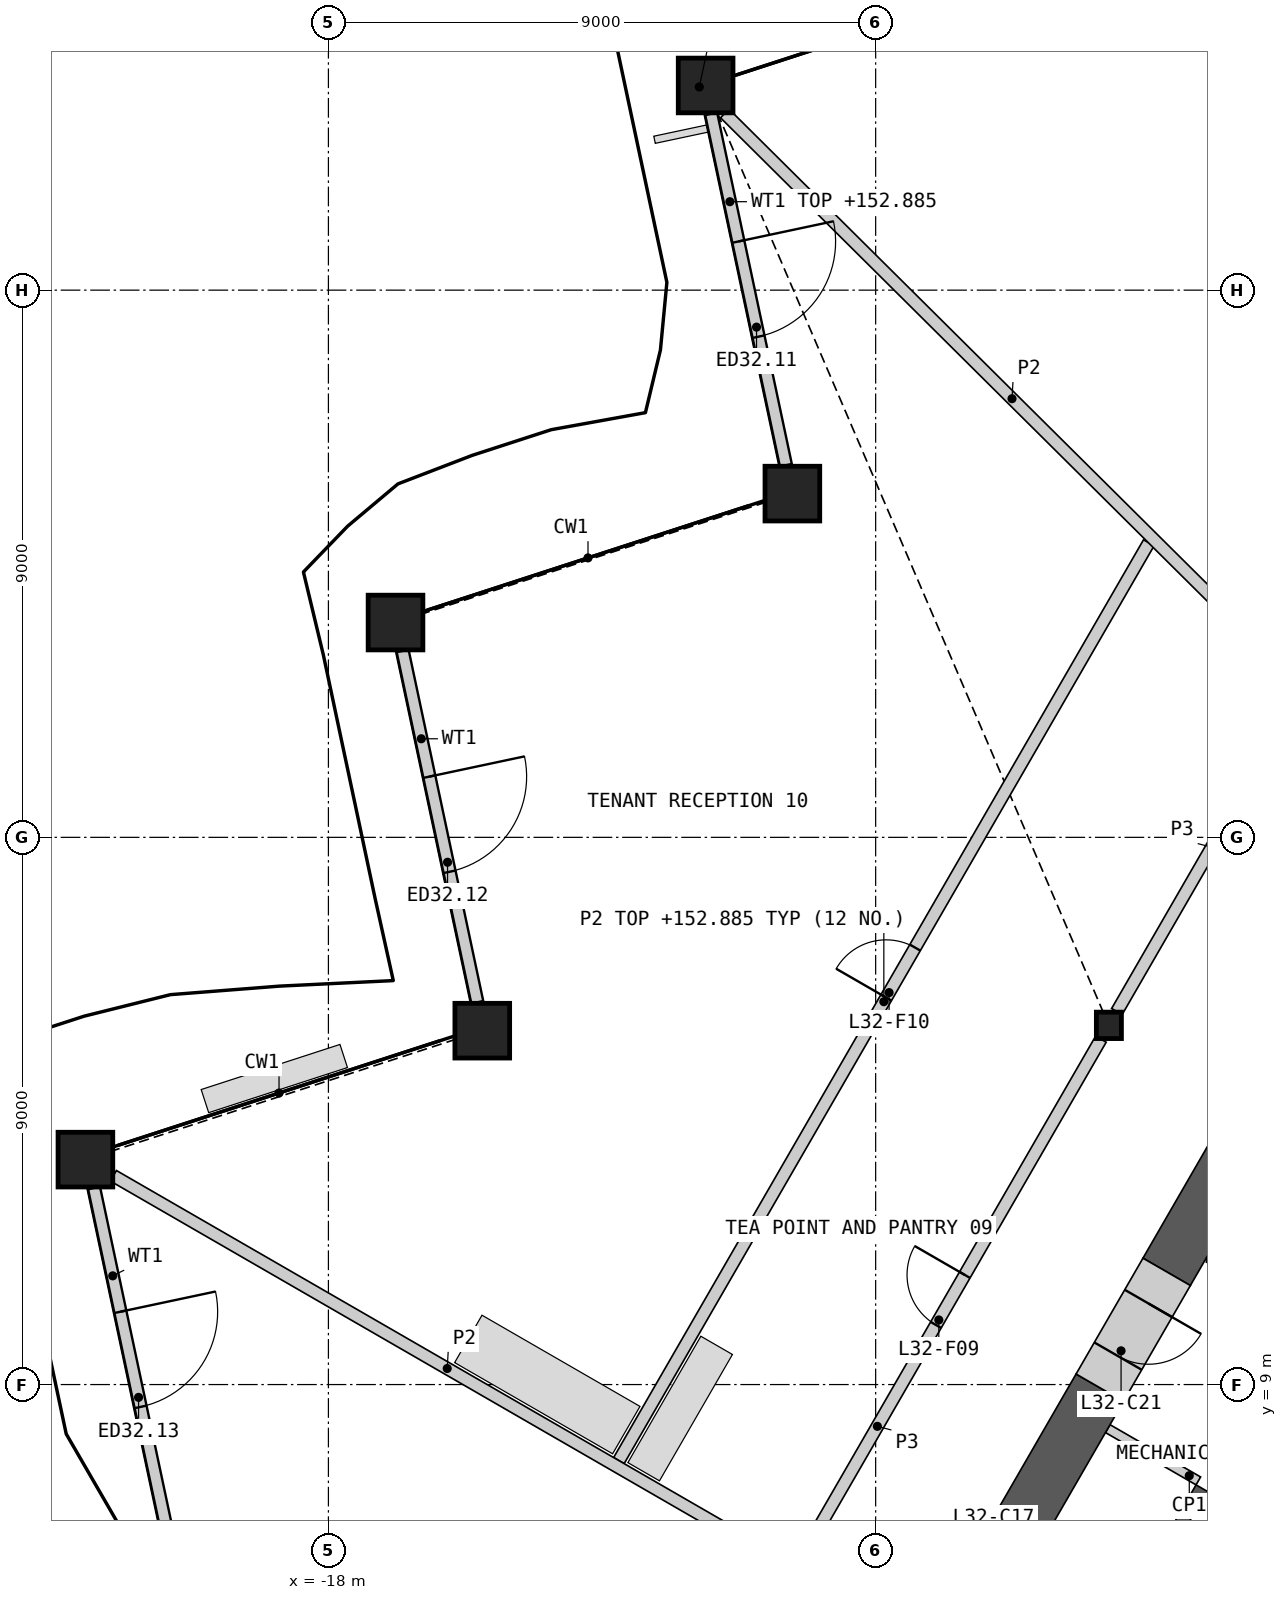
"""IFC4 building model, lengths in metres.
Left out: names, types, materials, properties, quantities, classifications, styles, units other than length and angle.
Written with IfcOpenShell. Run it as: python <this file> out.ifc"""

import sys

from ifc_helpers import new_model, si_unit, direction, frame, frame_2d, origin, origin_2d, place, context, subcontext, project, spatial, polyline, rectangle, hollow_rectangle, i_section, outline, extrude, element, fill, save


model = new_model("IFC4")
c1 = context("Model", 3, precision=1e-05, world=origin(), true_north=direction((0.0, 1.0)))
c2 = subcontext(c1, "Body", "Model", "MODEL_VIEW")
j1 = project(units=[si_unit("LENGTHUNIT", "METRE"), si_unit("PLANEANGLEUNIT", "RADIAN")], contexts=[c1])
p1 = place(None, origin())
s1 = spatial("IfcSite", under=j1, at=p1, CompositionType="ELEMENT")
p2 = place(p1, origin())
s2 = spatial("IfcBuilding", under=s1, at=p2, CompositionType="ELEMENT")
p3 = place(p2, frame((0.0, 0.0, 150.0)))
s3 = spatial("IfcBuildingStorey", under=s2, at=p3, CompositionType="ELEMENT", Elevation=150.0)
for number, where, z_axis, x_axis in (
    (1, (-11.796, 30.366, 0.0), (0.0, 0.0, 1.0), (1.0, 0.0, 0.0)),
    (2, (-10.37, 23.654, 0.0), (0.0, 0.0, 1.0), (1.0, 0.0, 0.0)),
    (3, (-16.896, 21.533, 0.0), (0.0, 0.0, 1.0), (1.0, 0.0, 0.0)),
    (4, (-15.469, 14.82, 0.0), (0.0, 0.0, 1.0), (1.0, 0.0, 0.0)),
    (5, (-21.996, 12.699, 0.0), (0.0, 0.0, 1.0), (1.0, 0.0, 0.0)),
):
    element("IfcColumn", number, at=place(p3, frame(where, z_axis=z_axis, x_axis=x_axis)), inside=s3, PredefinedType="COLUMN", context=c2, shape_type="SweptSolid", body=[
        extrude(hollow_rectangle(XDim=0.9, YDim=0.9, WallThickness=0.06, at=origin_2d()), origin(), (0.0, 0.0, 1.0), 4.2),
    ])
p4 = place(p3, frame((-5.164, 14.908, 0.0), z_axis=(0.0, 0.0, 1.0), x_axis=(1.0, 0.0, 0.0)))
e6 = element("IfcColumn", 6, at=p4, inside=s3, PredefinedType="COLUMN", context=c2, shape_type="SweptSolid", body=[
    extrude(i_section(OverallWidth=0.412, OverallDepth=0.435, WebThickness=0.036, FlangeThickness=0.057, at=origin_2d()), origin(), (0.0, 0.0, 1.0), 4.2),
])
p5 = place(p3, frame((-11.705, 29.9, 0.0), z_axis=(0.0, 0.0, 1.0), x_axis=(0.207917562075, -0.978146352741, 0.0)))
e7 = element("IfcWall", 7, at=p5, inside=s3, PredefinedType="SOLIDWALL", context=c2, shape_type="SweptSolid", body=[
    extrude(rectangle(XDim=5.909, YDim=0.2, at=frame_2d((2.954, 0.0))), origin(), (0.0, 0.0, 1.0), 2.885),
])
p6 = place(p5, frame((2.146, 0.0, 0.0)))
e8 = element("IfcOpeningElement", 8, at=p6, cuts=e7, PredefinedType="OPENING", context=c2, shape_type="SweptSolid", body=[
    extrude(rectangle(XDim=1.6, YDim=2.4, at=frame_2d((0.8, 1.2))), frame((0.0, 0.11, 0.0), z_axis=(0.0, -1.0, 0.0), x_axis=(1.0, 0.0, 0.0)), (0.0, 0.0, 1.0), 0.22),
])
p7 = place(p3, frame((-16.78, 21.066, 0.0), z_axis=(0.0, 0.0, 1.0), x_axis=(0.207917562075, -0.978146352741, 0.0)))
e9 = element("IfcWall", 9, at=p7, inside=s3, PredefinedType="SOLIDWALL", context=c2, shape_type="SweptSolid", body=[
    extrude(rectangle(XDim=5.909, YDim=0.2, at=frame_2d((2.954, 0.0))), origin(), (0.0, 0.0, 1.0), 3.189),
])
p8 = place(p7, frame((2.114, 0.0, 0.0)))
e10 = element("IfcOpeningElement", 10, at=p8, cuts=e9, PredefinedType="OPENING", context=c2, shape_type="SweptSolid", body=[
    extrude(rectangle(XDim=1.6, YDim=2.4, at=frame_2d((0.8, 1.2))), frame((0.0, 0.11, 0.0), z_axis=(0.0, -1.0, 0.0), x_axis=(1.0, 0.0, 0.0)), (0.0, 0.0, 1.0), 0.22),
])
p9 = place(p3, frame((-21.854, 12.233, 0.0), z_axis=(0.0, 0.0, 1.0), x_axis=(0.207925965623, -0.978144566421, 0.0)))
e11 = element("IfcWall", 11, at=p9, inside=s3, PredefinedType="SOLIDWALL", context=c2, shape_type="SweptSolid", body=[
    extrude(rectangle(XDim=5.908, YDim=0.2, at=frame_2d((2.954, 0.0))), origin(), (0.0, 0.0, 1.0), 3.189),
])
p10 = place(p9, frame((2.081, 0.0, 0.0)))
e12 = element("IfcOpeningElement", 12, at=p10, cuts=e11, PredefinedType="OPENING", context=c2, shape_type="SweptSolid", body=[
    extrude(rectangle(XDim=1.6, YDim=2.4, at=frame_2d((0.8, 1.2))), frame((0.0, 0.11, 0.0), z_axis=(0.0, -1.0, 0.0), x_axis=(1.0, 0.0, 0.0)), (0.0, 0.0, 1.0), 0.22),
])
p11 = place(p3, origin())
e13 = element("IfcWall", 13, at=p11, inside=s3, PredefinedType="SHEAR", context=c2, shape_type="SweptSolid", body=[
    extrude(outline(polyline([(-4.96, 0.208), (-7.131, 1.461), (-3.731, 7.35), (-1.561, 6.097), (-1.66, 5.924), (-3.652, 7.074), (-4.652, 5.342), (-2.66, 4.192), (-2.76, 4.019), (-4.752, 5.169), (-5.752, 3.437), (-3.76, 2.287), (-3.861, 2.113), (-5.852, 3.263), (-6.852, 1.531), (-4.861, 0.381), (-4.96, 0.208)])), origin(), (0.0, 0.0, 1.0), 3.8),
])
p12 = place(p3, frame((-3.693, 7.415, 0.0), z_axis=(0.0, 0.0, 1.0), x_axis=(-0.866024871741, 0.500000921525, 0.0)))
e14 = element("IfcWall", 14, at=p12, inside=s3, PredefinedType="PARTITIONING", context=c2, shape_type="SweptSolid", body=[
    extrude(rectangle(XDim=1.72, YDim=0.15, at=frame_2d((0.86, 0.0))), origin(), (0.0, 0.0, 1.0), 3.8),
])
p13 = place(p3, frame((-1.544, 11.087, 0.0), z_axis=(0.0, 0.0, 1.0), x_axis=(-1.0, 0.0, 0.0)))
e15 = element("IfcWall", 15, at=p13, inside=s3, PredefinedType="PARTITIONING", context=c2, shape_type="SweptSolid", body=[
    extrude(rectangle(XDim=2.016, YDim=0.15, at=frame_2d((1.008, 0.0))), origin(), (0.0, 0.0, 1.0), 3.8),
])
p14 = place(p3, frame((-0.39, 17.478, 0.0), z_axis=(0.0, 0.0, 1.0), x_axis=(-0.500007959642, -0.866020808234, 0.0)))
e16 = element("IfcWall", 16, at=p14, inside=s3, PredefinedType="SHEAR", context=c2, shape_type="SweptSolid", body=[
    extrude(rectangle(XDim=7.649, YDim=0.9, at=frame_2d((3.824, 0.0))), origin(), (0.0, 0.0, 1.0), 3.8),
])
p15 = place(p3, frame((-5.314, 8.948, 0.0), z_axis=(0.0, 0.0, 1.0), x_axis=(-0.49998480324, -0.86603417746, 0.0)))
e17 = element("IfcWall", 17, at=p15, inside=s3, PredefinedType="SHEAR", context=c2, shape_type="SweptSolid", body=[
    extrude(rectangle(XDim=2.792, YDim=0.9, at=frame_2d((1.396, 0.0))), origin(), (0.0, 0.0, 1.0), 3.8),
])
p16 = place(p3, frame((-4.214, 10.854, 0.0), z_axis=(0.0, 0.0, 1.0), x_axis=(-0.500077893725, -0.86598042715, 0.0)))
e18 = element("IfcWall", 18, at=p16, inside=s3, PredefinedType="SHEAR", context=c2, shape_type="SweptSolid", body=[
    extrude(rectangle(XDim=2.2, YDim=0.9, at=frame_2d((1.1, 0.0))), origin(), (0.0, 0.0, 1.0), 3.8),
])
p17 = place(p16, frame((0.6, 0.0, 0.0)))
e19 = element("IfcOpeningElement", 19, at=p17, cuts=e18, PredefinedType="OPENING", context=c2, shape_type="SweptSolid", body=[
    extrude(rectangle(XDim=1.0, YDim=2.1, at=frame_2d((0.5, 1.05))), frame((0.0, 0.46, 0.0), z_axis=(0.0, -1.0, 0.0), x_axis=(1.0, 0.0, 0.0)), (0.0, 0.0, 1.0), 0.92),
])
p18 = place(p3, frame((-10.197, 6.19, 0.0), z_axis=(0.0, 0.0, 1.0), x_axis=(0.500012035596, 0.866018454918, 0.0)))
e20 = element("IfcWall", 20, at=p18, inside=s3, PredefinedType="PARTITIONING", context=c2, shape_type="SweptSolid", body=[
    extrude(rectangle(XDim=9.803, YDim=0.2, at=frame_2d((4.902, 0.0))), origin(), (0.0, 0.0, 1.0), 3.8),
])
p19 = place(p18, frame((4.376, 0.0, 0.0)))
e21 = element("IfcOpeningElement", 21, at=p19, cuts=e20, PredefinedType="OPENING", context=c2, shape_type="SweptSolid", body=[
    extrude(rectangle(XDim=0.95, YDim=2.1, at=frame_2d((0.475, 1.05))), frame((0.0, 0.11, 0.0), z_axis=(0.0, -1.0, 0.0), x_axis=(1.0, 0.0, 0.0)), (0.0, 0.0, 1.0), 0.22),
])
p20 = place(p3, frame((-5.033, 15.135, 0.0), z_axis=(0.0, 0.0, 1.0), x_axis=(0.499980978912, 0.866036385336, 0.0)))
e22 = element("IfcWall", 22, at=p20, inside=s3, PredefinedType="PARTITIONING", context=c2, shape_type="SweptSolid", body=[
    extrude(rectangle(XDim=6.24, YDim=0.2, at=frame_2d((3.12, 0.0))), origin(), (0.0, 0.0, 1.0), 3.8),
])
p21 = place(p3, frame((-13.223, 7.75, 0.0), z_axis=(0.0, 0.0, 1.0), x_axis=(0.499991226912, 0.86603046887, 0.0)))
e23 = element("IfcWall", 23, at=p21, inside=s3, PredefinedType="PARTITIONING", context=c2, shape_type="SweptSolid", body=[
    extrude(rectangle(XDim=17.429, YDim=0.2, at=frame_2d((8.715, 0.0))), origin(), (0.0, 0.0, 1.0), 2.885),
])
p22 = place(p21, frame((8.792, 0.0, 0.0)))
e24 = element("IfcOpeningElement", 24, at=p22, cuts=e23, PredefinedType="OPENING", context=c2, shape_type="SweptSolid", body=[
    extrude(rectangle(XDim=0.95, YDim=2.1, at=frame_2d((0.475, 1.05))), frame((0.0, 0.11, 0.0), z_axis=(0.0, -1.0, 0.0), x_axis=(1.0, 0.0, 0.0)), (0.0, 0.0, 1.0), 0.22),
])
p23 = place(p3, frame((-11.481, 29.906, 0.0), z_axis=(0.0, 0.0, 1.0), x_axis=(0.709504632293, -0.704700771076, 0.0)))
e25 = element("IfcWall", 25, at=p23, inside=s3, PredefinedType="PARTITIONING", context=c2, shape_type="SweptSolid", body=[
    extrude(rectangle(XDim=13.315, YDim=0.2, at=frame_2d((6.658, 0.0))), origin(), (0.0, 0.0, 1.0), 2.885),
])
p24 = place(p3, frame((-21.536, 12.434, 0.0), z_axis=(0.0, 0.0, 1.0), x_axis=(0.86602461759, -0.500001361726, 0.0)))
e26 = element("IfcWall", 26, at=p24, inside=s3, PredefinedType="PARTITIONING", context=c2, shape_type="SweptSolid", body=[
    extrude(rectangle(XDim=12.679, YDim=0.2, at=frame_2d((6.34, 0.0))), origin(), (0.0, 0.0, 1.0), 2.885),
])
p25 = place(p6, origin())
e27 = element("IfcDoor", 27, at=p25, inside=s3, OperationType="DOUBLE_DOOR_SINGLE_SWING", PredefinedType="DOOR", context=c2, shape_type="SweptSolid", body=[
    extrude(rectangle(XDim=1.6, YDim=2.4, at=frame_2d((0.8, 1.2))), frame((0.0, 0.025, 0.0), z_axis=(0.0, -1.0, 0.0), x_axis=(1.0, 0.0, 0.0)), (0.0, 0.0, 1.0), 0.05),
])
fill(e8, e27)
p26 = place(p8, origin())
e28 = element("IfcDoor", 28, at=p26, inside=s3, OperationType="DOUBLE_DOOR_SINGLE_SWING", PredefinedType="DOOR", context=c2, shape_type="SweptSolid", body=[
    extrude(rectangle(XDim=1.6, YDim=2.4, at=frame_2d((0.8, 1.2))), frame((0.0, 0.025, 0.0), z_axis=(0.0, -1.0, 0.0), x_axis=(1.0, 0.0, 0.0)), (0.0, 0.0, 1.0), 0.05),
])
fill(e10, e28)
p27 = place(p10, origin())
e29 = element("IfcDoor", 29, at=p27, inside=s3, OperationType="DOUBLE_DOOR_SINGLE_SWING", PredefinedType="DOOR", context=c2, shape_type="SweptSolid", body=[
    extrude(rectangle(XDim=1.6, YDim=2.4, at=frame_2d((0.8, 1.2))), frame((0.0, 0.025, 0.0), z_axis=(0.0, -1.0, 0.0), x_axis=(1.0, 0.0, 0.0)), (0.0, 0.0, 1.0), 0.05),
])
fill(e12, e29)
p28 = place(p17, origin())
e30 = element("IfcDoor", 30, at=p28, inside=s3, OperationType="SINGLE_SWING_LEFT", PredefinedType="DOOR", context=c2, shape_type="SweptSolid", body=[
    extrude(rectangle(XDim=1.0, YDim=2.1, at=frame_2d((0.5, 1.05))), frame((0.0, 0.205, 0.0), z_axis=(0.0, -1.0, 0.0), x_axis=(1.0, 0.0, 0.0)), (0.0, 0.0, 1.0), 0.05),
])
fill(e19, e30)
p29 = place(p19, origin())
e31 = element("IfcDoor", 31, at=p29, inside=s3, OperationType="SINGLE_SWING_RIGHT", PredefinedType="DOOR", context=c2, shape_type="SweptSolid", body=[
    extrude(rectangle(XDim=0.95, YDim=2.1, at=frame_2d((0.475, 1.05))), frame((0.0, 0.025, 0.0), z_axis=(0.0, -1.0, 0.0), x_axis=(1.0, 0.0, 0.0)), (0.0, 0.0, 1.0), 0.05),
])
fill(e21, e31)
p30 = place(p22, origin())
e32 = element("IfcDoor", 32, at=p30, inside=s3, OperationType="SINGLE_SWING_LEFT", PredefinedType="DOOR", context=c2, shape_type="SweptSolid", body=[
    extrude(rectangle(XDim=0.95, YDim=2.1, at=frame_2d((0.475, 1.05))), frame((0.0, 0.025, 0.0), z_axis=(0.0, -1.0, 0.0), x_axis=(1.0, 0.0, 0.0)), (0.0, 0.0, 1.0), 0.05),
])
fill(e24, e32)
save(model, sys.argv[1])
